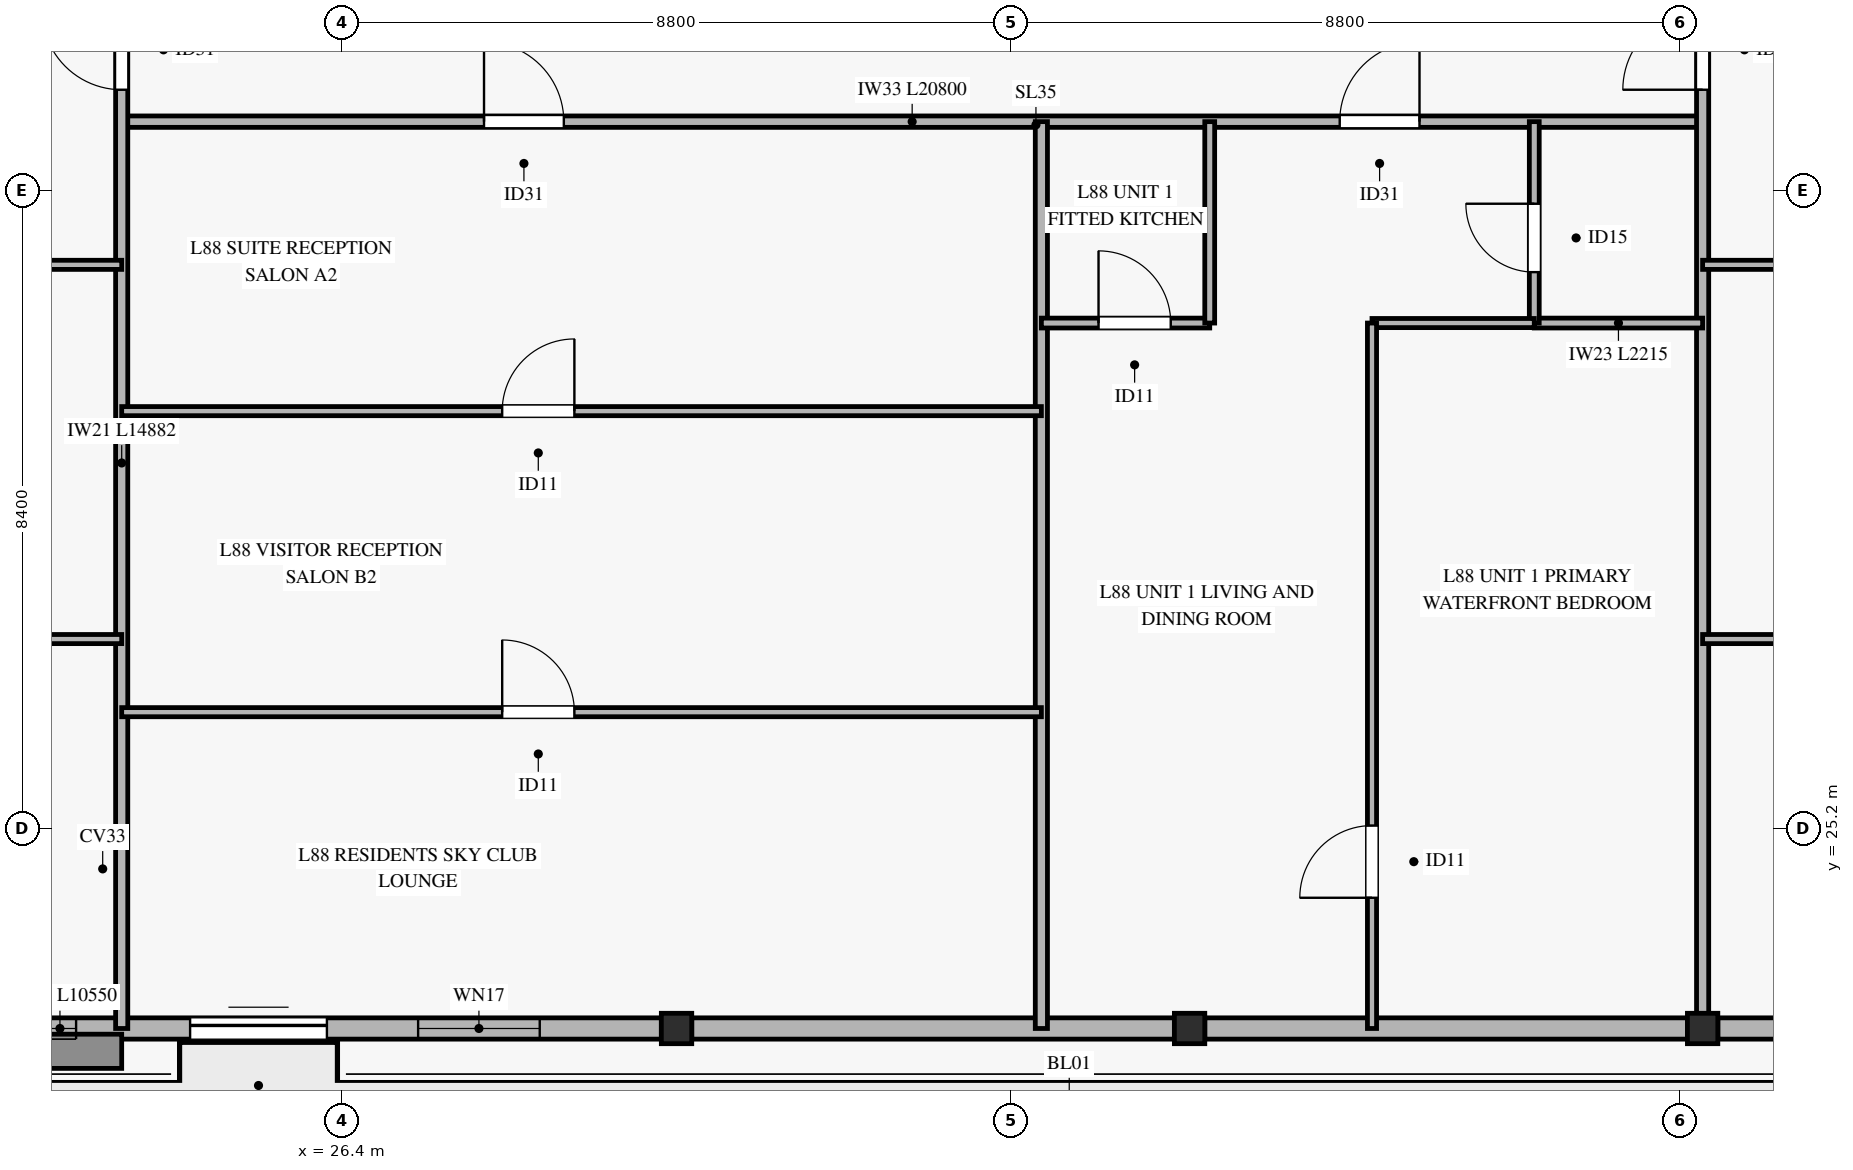
"""IFC4 building model, lengths in metres.
Left out: names, types, materials, properties, quantities, classifications, styles, units other than length and angle.
Written with IfcOpenShell. Run it as: python <this file> out.ifc"""

import sys

from ifc_helpers import new_model, si_unit, direction, frame, frame_2d, origin, origin_2d, place, context, subcontext, project, spatial, rectangle, hollow_rectangle, extrude, source, transform, mapped, element, fill, save


model = new_model("IFC4")
c1 = context("Model", 3, precision=1e-05, world=origin(), true_north=direction((0.0, 1.0)))
c2 = subcontext(c1, "Body", "Model", "MODEL_VIEW")
j1 = project(units=[si_unit("LENGTHUNIT", "METRE"), si_unit("PLANEANGLEUNIT", "RADIAN")], contexts=[c1])
p1 = place(None, origin())
s1 = spatial("IfcSite", under=j1, at=p1, CompositionType="ELEMENT")
p2 = place(p1, origin())
s2 = spatial("IfcBuilding", under=s1, at=p2, CompositionType="ELEMENT")
p3 = place(p2, frame((0.0, 0.0, 339.1)))
s3 = spatial("IfcBuildingStorey", under=s2, at=p3, CompositionType="ELEMENT", Elevation=339.1)
m1 = source(origin(), c2, "Body", "SweptSolid", [
    extrude(hollow_rectangle(XDim=0.4, YDim=0.4, WallThickness=0.02, at=origin_2d()), origin(), (0.0, 0.0, 1.0), 3.185),
])
for number, where, z_axis, x_axis in (
    (1, (30.8, 22.568, 0.0), (0.0, 0.0, 1.0), (1.0, 0.0, 0.0)),
    (2, (37.55, 22.568, 0.0), (0.0, 0.0, 1.0), (1.0, 0.0, 0.0)),
    (3, (44.3, 22.568, 0.0), (0.0, 0.0, 1.0), (1.0, 0.0, 0.0)),
):
    element("IfcColumn", number, at=place(p3, frame(where, z_axis=z_axis, x_axis=x_axis)), inside=s3, PredefinedType="COLUMN", context=c2, shape_type="MappedRepresentation", body=[
        mapped(m1, transform((0.0, 0.0, 0.0), x_axis=(1.0, 0.0, 0.0), y_axis=(0.0, 1.0, 0.0), z_axis=(0.0, 0.0, 1.0), scale=1.0)),
    ])
p4 = place(p3, frame((20.05, 22.568, 0.0), z_axis=(0.0, 0.0, 1.0), x_axis=(1.0, 0.0, 0.0)))
e4 = element("IfcWall", 4, at=p4, inside=s3, PredefinedType="SOLIDWALL", context=c2, shape_type="SweptSolid", body=[
    extrude(rectangle(XDim=10.55, YDim=0.28, at=frame_2d((5.275, 0.0))), origin(), (0.0, 0.0, 1.0), 2.815),
])
p5 = place(p4, frame((4.35, 0.0, 0.0)))
e5 = element("IfcOpeningElement", 5, at=p5, cuts=e4, PredefinedType="OPENING", context=c2, shape_type="SweptSolid", body=[
    extrude(rectangle(XDim=1.8, YDim=2.25, at=frame_2d((0.9, 1.125))), frame((0.0, 0.15, 0.0), z_axis=(0.0, -1.0, 0.0), x_axis=(1.0, 0.0, 0.0)), (0.0, 0.0, 1.0), 0.3),
])
p6 = place(p4, frame((0.65, 0.0, 0.45)))
e6 = element("IfcOpeningElement", 6, at=p6, cuts=e4, PredefinedType="OPENING", context=c2, shape_type="SweptSolid", body=[
    extrude(rectangle(XDim=2.2, YDim=2.1, at=frame_2d((1.1, 1.05))), frame((0.0, 0.15, 0.0), z_axis=(0.0, -1.0, 0.0), x_axis=(1.0, 0.0, 0.0)), (0.0, 0.0, 1.0), 0.3),
])
p7 = place(p4, frame((7.35, 0.0, 0.45)))
e7 = element("IfcOpeningElement", 7, at=p7, cuts=e4, PredefinedType="OPENING", context=c2, shape_type="SweptSolid", body=[
    extrude(rectangle(XDim=1.6, YDim=2.0, at=frame_2d((0.8, 1.0))), frame((0.0, 0.15, 0.0), z_axis=(0.0, -1.0, 0.0), x_axis=(1.0, 0.0, 0.0)), (0.0, 0.0, 1.0), 0.3),
])
for number, where, z_axis, x_axis in (
    (8, (31.0, 22.568, 0.0), (0.0, 0.0, 1.0), (1.0, 0.0, 0.0)),
    (9, (37.75, 22.568, 0.0), (0.0, 0.0, 1.0), (1.0, 0.0, 0.0)),
):
    element("IfcWall", number, at=place(p3, frame(where, z_axis=z_axis, x_axis=x_axis)), inside=s3, PredefinedType="SOLIDWALL", context=c2, shape_type="SweptSolid", body=[
        extrude(rectangle(XDim=6.35, YDim=0.28, at=frame_2d((3.175, 0.0))), origin(), (0.0, 0.0, 1.0), 2.815),
    ])
p8 = place(p3, frame((44.5, 22.568, 0.0), z_axis=(0.0, 0.0, 1.0), x_axis=(1.0, 0.0, 0.0)))
e10 = element("IfcWall", 10, at=p8, inside=s3, PredefinedType="SOLIDWALL", context=c2, shape_type="SweptSolid", body=[
    extrude(rectangle(XDim=5.85, YDim=0.28, at=frame_2d((2.925, 0.0))), origin(), (0.0, 0.0, 1.0), 2.815),
])
p9 = place(p8, frame((2.0, 0.0, 0.0)))
e11 = element("IfcOpeningElement", 11, at=p9, cuts=e10, PredefinedType="OPENING", context=c2, shape_type="SweptSolid", body=[
    extrude(rectangle(XDim=1.8, YDim=2.25, at=frame_2d((0.9, 1.125))), frame((0.0, 0.15, 0.0), z_axis=(0.0, -1.0, 0.0), x_axis=(1.0, 0.0, 0.0)), (0.0, 0.0, 1.0), 0.3),
])
p10 = place(p3, frame((23.5, 34.5, 0.0), z_axis=(0.0, 0.0, 1.0), x_axis=(1.0, 0.0, 0.0)))
e12 = element("IfcWall", 12, at=p10, inside=s3, PredefinedType="PARTITIONING", context=c2, shape_type="SweptSolid", body=[
    extrude(rectangle(XDim=20.8, YDim=0.15, at=frame_2d((10.4, 0.0))), origin(), (0.0, 0.0, 1.0), 2.47),
])
p11 = place(p10, frame((4.767, 0.0, 0.0)))
e13 = element("IfcOpeningElement", 13, at=p11, cuts=e12, PredefinedType="OPENING", context=c2, shape_type="SweptSolid", body=[
    extrude(rectangle(XDim=1.05, YDim=2.15, at=frame_2d((0.525, 1.075))), frame((0.0, 0.085, 0.0), z_axis=(0.0, -1.0, 0.0), x_axis=(1.0, 0.0, 0.0)), (0.0, 0.0, 1.0), 0.17),
])
p12 = place(p10, frame((16.025, 0.0, 0.0)))
e14 = element("IfcOpeningElement", 14, at=p12, cuts=e12, PredefinedType="OPENING", context=c2, shape_type="SweptSolid", body=[
    extrude(rectangle(XDim=1.05, YDim=2.15, at=frame_2d((0.525, 1.075))), frame((0.0, 0.085, 0.0), z_axis=(0.0, -1.0, 0.0), x_axis=(1.0, 0.0, 0.0)), (0.0, 0.0, 1.0), 0.17),
])
p13 = place(p3, frame((23.5, 22.568, 0.0), z_axis=(0.0, 0.0, 1.0), x_axis=(0.0, 1.0, 0.0)))
e15 = element("IfcWall", 15, at=p13, inside=s3, PredefinedType="PARTITIONING", context=c2, shape_type="SweptSolid", body=[
    extrude(rectangle(XDim=14.882, YDim=0.16, at=frame_2d((7.441, 0.0))), origin(), (0.0, 0.0, 1.0), 2.77),
])
p14 = place(p13, frame((12.352, 0.0, 0.0)))
e16 = element("IfcOpeningElement", 16, at=p14, cuts=e15, PredefinedType="OPENING", context=c2, shape_type="SweptSolid", body=[
    extrude(rectangle(XDim=1.05, YDim=2.15, at=frame_2d((0.525, 1.075))), frame((0.0, 0.09, 0.0), z_axis=(0.0, -1.0, 0.0), x_axis=(1.0, 0.0, 0.0)), (0.0, 0.0, 1.0), 0.18),
])
p15 = place(p3, frame((35.6, 22.568, 0.0), z_axis=(0.0, 0.0, 1.0), x_axis=(0.0, 1.0, 0.0)))
e17 = element("IfcWall", 17, at=p15, inside=s3, PredefinedType="PARTITIONING", context=c2, shape_type="SweptSolid", body=[
    extrude(rectangle(XDim=11.932, YDim=0.16, at=frame_2d((5.966, 0.0))), origin(), (0.0, 0.0, 1.0), 2.77),
])
p16 = place(p3, frame((44.3, 22.568, 0.0), z_axis=(0.0, 0.0, 1.0), x_axis=(0.0, 1.0, 0.0)))
e18 = element("IfcWall", 18, at=p16, inside=s3, PredefinedType="PARTITIONING", context=c2, shape_type="SweptSolid", body=[
    extrude(rectangle(XDim=14.882, YDim=0.16, at=frame_2d((7.441, 0.0))), origin(), (0.0, 0.0, 1.0), 2.47),
])
p17 = place(p16, frame((12.352, 0.0, 0.0)))
e19 = element("IfcOpeningElement", 19, at=p17, cuts=e18, PredefinedType="OPENING", context=c2, shape_type="SweptSolid", body=[
    extrude(rectangle(XDim=1.05, YDim=2.15, at=frame_2d((0.525, 1.075))), frame((0.0, 0.09, 0.0), z_axis=(0.0, -1.0, 0.0), x_axis=(1.0, 0.0, 0.0)), (0.0, 0.0, 1.0), 0.18),
])
p18 = place(p3, frame((11.685, 27.692, 0.0), z_axis=(0.0, 0.0, 1.0), x_axis=(1.0, 0.0, 0.0)))
e20 = element("IfcWall", 20, at=p18, inside=s3, PredefinedType="PARTITIONING", context=c2, shape_type="SweptSolid", body=[
    extrude(rectangle(XDim=11.815, YDim=0.12, at=frame_2d((5.907, 0.0))), origin(), (0.0, 0.0, 1.0), 2.47),
])
p19 = place(p18, frame((5.012, 0.0, 0.0)))
e21 = element("IfcOpeningElement", 21, at=p19, cuts=e20, PredefinedType="OPENING", context=c2, shape_type="SweptSolid", body=[
    extrude(rectangle(XDim=0.95, YDim=2.1, at=frame_2d((0.475, 1.05))), frame((0.0, 0.07, 0.0), z_axis=(0.0, -1.0, 0.0), x_axis=(1.0, 0.0, 0.0)), (0.0, 0.0, 1.0), 0.14),
])
p20 = place(p3, frame((11.685, 32.616, 0.0), z_axis=(0.0, 0.0, 1.0), x_axis=(1.0, 0.0, 0.0)))
e22 = element("IfcWall", 22, at=p20, inside=s3, PredefinedType="PARTITIONING", context=c2, shape_type="SweptSolid", body=[
    extrude(rectangle(XDim=11.815, YDim=0.12, at=frame_2d((5.907, 0.0))), origin(), (0.0, 0.0, 1.0), 2.47),
])
p21 = place(p20, frame((5.012, 0.0, 0.0)))
e23 = element("IfcOpeningElement", 23, at=p21, cuts=e22, PredefinedType="OPENING", context=c2, shape_type="SweptSolid", body=[
    extrude(rectangle(XDim=0.95, YDim=2.1, at=frame_2d((0.475, 1.05))), frame((0.0, 0.07, 0.0), z_axis=(0.0, -1.0, 0.0), x_axis=(1.0, 0.0, 0.0)), (0.0, 0.0, 1.0), 0.14),
])
p22 = place(p3, frame((23.5, 26.73, 0.0), z_axis=(0.0, 0.0, 1.0), x_axis=(1.0, 0.0, 0.0)))
e24 = element("IfcWall", 24, at=p22, inside=s3, PredefinedType="PARTITIONING", context=c2, shape_type="SweptSolid", body=[
    extrude(rectangle(XDim=12.1, YDim=0.12, at=frame_2d((6.05, 0.0))), origin(), (0.0, 0.0, 1.0), 2.47),
])
p23 = place(p22, frame((5.006, 0.0, 0.0)))
e25 = element("IfcOpeningElement", 25, at=p23, cuts=e24, PredefinedType="OPENING", context=c2, shape_type="SweptSolid", body=[
    extrude(rectangle(XDim=0.95, YDim=2.1, at=frame_2d((0.475, 1.05))), frame((0.0, 0.07, 0.0), z_axis=(0.0, -1.0, 0.0), x_axis=(1.0, 0.0, 0.0)), (0.0, 0.0, 1.0), 0.14),
])
p24 = place(p3, frame((23.5, 30.691, 0.0), z_axis=(0.0, 0.0, 1.0), x_axis=(1.0, 0.0, 0.0)))
e26 = element("IfcWall", 26, at=p24, inside=s3, PredefinedType="PARTITIONING", context=c2, shape_type="SweptSolid", body=[
    extrude(rectangle(XDim=12.1, YDim=0.12, at=frame_2d((6.05, 0.0))), origin(), (0.0, 0.0, 1.0), 2.47),
])
p25 = place(p24, frame((5.006, 0.0, 0.0)))
e27 = element("IfcOpeningElement", 27, at=p25, cuts=e26, PredefinedType="OPENING", context=c2, shape_type="SweptSolid", body=[
    extrude(rectangle(XDim=0.95, YDim=2.1, at=frame_2d((0.475, 1.05))), frame((0.0, 0.07, 0.0), z_axis=(0.0, -1.0, 0.0), x_axis=(1.0, 0.0, 0.0)), (0.0, 0.0, 1.0), 0.14),
])
p26 = place(p3, frame((35.6, 31.85, 0.0), z_axis=(0.0, 0.0, 1.0), x_axis=(1.0, 0.0, 0.0)))
e28 = element("IfcWall", 28, at=p26, inside=s3, PredefinedType="PARTITIONING", context=c2, shape_type="SweptSolid", body=[
    extrude(rectangle(XDim=2.215, YDim=0.13, at=frame_2d((1.107, 0.0))), origin(), (0.0, 0.0, 1.0), 2.47),
])
p27 = place(p26, frame((0.752, 0.0, 0.0)))
e29 = element("IfcOpeningElement", 29, at=p27, cuts=e28, PredefinedType="OPENING", context=c2, shape_type="SweptSolid", body=[
    extrude(rectangle(XDim=0.95, YDim=2.1, at=frame_2d((0.475, 1.05))), frame((0.0, 0.075, 0.0), z_axis=(0.0, -1.0, 0.0), x_axis=(1.0, 0.0, 0.0)), (0.0, 0.0, 1.0), 0.15),
])
p28 = place(p3, frame((37.815, 31.85, 0.0), z_axis=(0.0, 0.0, 1.0), x_axis=(0.0, 1.0, 0.0)))
e30 = element("IfcWall", 30, at=p28, inside=s3, PredefinedType="PARTITIONING", context=c2, shape_type="SweptSolid", body=[
    extrude(rectangle(XDim=2.65, YDim=0.13, at=frame_2d((1.325, 0.0))), origin(), (0.0, 0.0, 1.0), 2.77),
])
p29 = place(p3, frame((42.085, 31.85, 0.0), z_axis=(0.0, 0.0, 1.0), x_axis=(1.0, 0.0, 0.0)))
e31 = element("IfcWall", 31, at=p29, inside=s3, PredefinedType="PARTITIONING", context=c2, shape_type="SweptSolid", body=[
    extrude(rectangle(XDim=2.215, YDim=0.13, at=frame_2d((1.107, 0.0))), origin(), (0.0, 0.0, 1.0), 2.47),
])
p30 = place(p3, frame((42.085, 31.85, 0.0), z_axis=(0.0, 0.0, 1.0), x_axis=(0.0, 1.0, 0.0)))
e32 = element("IfcWall", 32, at=p30, inside=s3, PredefinedType="PARTITIONING", context=c2, shape_type="SweptSolid", body=[
    extrude(rectangle(XDim=2.65, YDim=0.13, at=frame_2d((1.325, 0.0))), origin(), (0.0, 0.0, 1.0), 2.77),
])
p31 = place(p30, frame((0.67, 0.0, 0.0)))
e33 = element("IfcOpeningElement", 33, at=p31, cuts=e32, PredefinedType="OPENING", context=c2, shape_type="SweptSolid", body=[
    extrude(rectangle(XDim=0.9, YDim=2.1, at=frame_2d((0.45, 1.05))), frame((0.0, 0.075, 0.0), z_axis=(0.0, -1.0, 0.0), x_axis=(1.0, 0.0, 0.0)), (0.0, 0.0, 1.0), 0.15),
])
p32 = place(p3, frame((39.95, 31.85, 0.0), z_axis=(0.0, 0.0, 1.0), x_axis=(1.0, 0.0, 0.0)))
e34 = element("IfcWall", 34, at=p32, inside=s3, PredefinedType="PARTITIONING", context=c2, shape_type="SweptSolid", body=[
    extrude(rectangle(XDim=2.135, YDim=0.12, at=frame_2d((1.067, 0.0))), origin(), (0.0, 0.0, 1.0), 3.185),
])
p33 = place(p3, frame((39.95, 22.568, 0.0), z_axis=(0.0, 0.0, 1.0), x_axis=(0.0, 1.0, 0.0)))
e35 = element("IfcWall", 35, at=p33, inside=s3, PredefinedType="PARTITIONING", context=c2, shape_type="SweptSolid", body=[
    extrude(rectangle(XDim=9.282, YDim=0.12, at=frame_2d((4.641, 0.0))), origin(), (0.0, 0.0, 1.0), 2.77),
])
p34 = place(p33, frame((1.72, 0.0, 0.0)))
e36 = element("IfcOpeningElement", 36, at=p34, cuts=e35, PredefinedType="OPENING", context=c2, shape_type="SweptSolid", body=[
    extrude(rectangle(XDim=0.95, YDim=2.1, at=frame_2d((0.475, 1.05))), frame((0.0, 0.07, 0.0), z_axis=(0.0, -1.0, 0.0), x_axis=(1.0, 0.0, 0.0)), (0.0, 0.0, 1.0), 0.14),
])
p35 = place(p3, frame((44.3, 27.692, 0.0), z_axis=(0.0, 0.0, 1.0), x_axis=(1.0, 0.0, 0.0)))
e37 = element("IfcWall", 37, at=p35, inside=s3, PredefinedType="PARTITIONING", context=c2, shape_type="SweptSolid", body=[
    extrude(rectangle(XDim=14.415, YDim=0.12, at=frame_2d((7.208, 0.0))), origin(), (0.0, 0.0, 1.0), 2.47),
])
p36 = place(p35, frame((5.852, 0.0, 0.0)))
e38 = element("IfcOpeningElement", 38, at=p36, cuts=e37, PredefinedType="OPENING", context=c2, shape_type="SweptSolid", body=[
    extrude(rectangle(XDim=0.95, YDim=2.1, at=frame_2d((0.475, 1.05))), frame((0.0, 0.07, 0.0), z_axis=(0.0, -1.0, 0.0), x_axis=(1.0, 0.0, 0.0)), (0.0, 0.0, 1.0), 0.14),
])
p37 = place(p3, frame((44.3, 32.616, 0.0), z_axis=(0.0, 0.0, 1.0), x_axis=(1.0, 0.0, 0.0)))
e39 = element("IfcWall", 39, at=p37, inside=s3, PredefinedType="PARTITIONING", context=c2, shape_type="SweptSolid", body=[
    extrude(rectangle(XDim=14.415, YDim=0.12, at=frame_2d((7.208, 0.0))), origin(), (0.0, 0.0, 1.0), 2.47),
])
p38 = place(p37, frame((5.852, 0.0, 0.0)))
e40 = element("IfcOpeningElement", 40, at=p38, cuts=e39, PredefinedType="OPENING", context=c2, shape_type="SweptSolid", body=[
    extrude(rectangle(XDim=0.95, YDim=2.1, at=frame_2d((0.475, 1.05))), frame((0.0, 0.07, 0.0), z_axis=(0.0, -1.0, 0.0), x_axis=(1.0, 0.0, 0.0)), (0.0, 0.0, 1.0), 0.14),
])
m2 = source(origin(), c2, "Body", "SweptSolid", [
    extrude(rectangle(XDim=1.8, YDim=2.25, at=frame_2d((0.9, 1.125))), frame((0.0, 0.025, 0.0), z_axis=(0.0, -1.0, 0.0), x_axis=(1.0, 0.0, 0.0)), (0.0, 0.0, 1.0), 0.05),
])
p39 = place(p5, origin())
e41 = element("IfcDoor", 41, at=p39, inside=s3, OperationType="SLIDING_TO_LEFT", PredefinedType="DOOR", context=c2, shape_type="MappedRepresentation", body=[
    mapped(m2, transform((0.0, 0.0, 0.0), x_axis=(1.0, 0.0, 0.0), y_axis=(0.0, 1.0, 0.0), z_axis=(0.0, 0.0, 1.0), scale=1.0)),
])
fill(e5, e41)
m3 = source(origin(), c2, "Body", "SweptSolid", [
    extrude(rectangle(XDim=2.2, YDim=2.1, at=frame_2d((1.1, 1.05))), frame((0.0, 0.03, 0.0), z_axis=(0.0, -1.0, 0.0), x_axis=(1.0, 0.0, 0.0)), (0.0, 0.0, 1.0), 0.06),
])
p40 = place(p6, origin())
e42 = element("IfcWindow", 42, at=p40, inside=s3, PartitioningType="SINGLE_PANEL", PredefinedType="WINDOW", context=c2, shape_type="MappedRepresentation", body=[
    mapped(m3, transform((0.0, 0.0, 0.0), x_axis=(1.0, 0.0, 0.0), y_axis=(0.0, 1.0, 0.0), z_axis=(0.0, 0.0, 1.0), scale=1.0)),
])
fill(e6, e42)
m4 = source(origin(), c2, "Body", "SweptSolid", [
    extrude(rectangle(XDim=1.6, YDim=2.0, at=frame_2d((0.8, 1.0))), frame((0.0, 0.03, 0.0), z_axis=(0.0, -1.0, 0.0), x_axis=(1.0, 0.0, 0.0)), (0.0, 0.0, 1.0), 0.06),
])
p41 = place(p7, origin())
e43 = element("IfcWindow", 43, at=p41, inside=s3, PartitioningType="SINGLE_PANEL", PredefinedType="WINDOW", context=c2, shape_type="MappedRepresentation", body=[
    mapped(m4, transform((0.0, 0.0, 0.0), x_axis=(1.0, 0.0, 0.0), y_axis=(0.0, 1.0, 0.0), z_axis=(0.0, 0.0, 1.0), scale=1.0)),
])
fill(e7, e43)
m5 = source(origin(), c2, "Body", "SweptSolid", [
    extrude(rectangle(XDim=1.05, YDim=2.15, at=frame_2d((0.525, 1.075))), frame((0.0, 0.025, 0.0), z_axis=(0.0, -1.0, 0.0), x_axis=(1.0, 0.0, 0.0)), (0.0, 0.0, 1.0), 0.05),
])
p42 = place(p14, origin())
e44 = element("IfcDoor", 44, at=p42, inside=s3, OperationType="SINGLE_SWING_RIGHT", PredefinedType="DOOR", context=c2, shape_type="MappedRepresentation", body=[
    mapped(m5, transform((0.0, 0.0, 0.0), x_axis=(1.0, 0.0, 0.0), y_axis=(0.0, 1.0, 0.0), z_axis=(0.0, 0.0, 1.0), scale=1.0)),
])
fill(e16, e44)
p43 = place(p11, origin())
e45 = element("IfcDoor", 45, at=p43, inside=s3, OperationType="SINGLE_SWING_LEFT", PredefinedType="DOOR", context=c2, shape_type="MappedRepresentation", body=[
    mapped(m5, transform((0.0, 0.0, 0.0), x_axis=(1.0, 0.0, 0.0), y_axis=(0.0, 1.0, 0.0), z_axis=(0.0, 0.0, 1.0), scale=1.0)),
])
fill(e13, e45)
m6 = source(origin(), c2, "Body", "SweptSolid", [
    extrude(rectangle(XDim=0.95, YDim=2.1, at=frame_2d((0.475, 1.05))), frame((0.0, 0.025, 0.0), z_axis=(0.0, -1.0, 0.0), x_axis=(1.0, 0.0, 0.0)), (0.0, 0.0, 1.0), 0.05),
])
p44 = place(p25, origin())
e46 = element("IfcDoor", 46, at=p44, inside=s3, OperationType="SINGLE_SWING_RIGHT", PredefinedType="DOOR", context=c2, shape_type="MappedRepresentation", body=[
    mapped(m6, transform((0.0, 0.0, 0.0), x_axis=(1.0, 0.0, 0.0), y_axis=(0.0, 1.0, 0.0), z_axis=(0.0, 0.0, 1.0), scale=1.0)),
])
fill(e27, e46)
p45 = place(p23, origin())
e47 = element("IfcDoor", 47, at=p45, inside=s3, OperationType="SINGLE_SWING_LEFT", PredefinedType="DOOR", context=c2, shape_type="MappedRepresentation", body=[
    mapped(m6, transform((0.0, 0.0, 0.0), x_axis=(1.0, 0.0, 0.0), y_axis=(0.0, 1.0, 0.0), z_axis=(0.0, 0.0, 1.0), scale=1.0)),
])
fill(e25, e47)
p46 = place(p12, origin())
e48 = element("IfcDoor", 48, at=p46, inside=s3, OperationType="SINGLE_SWING_RIGHT", PredefinedType="DOOR", context=c2, shape_type="MappedRepresentation", body=[
    mapped(m5, transform((0.0, 0.0, 0.0), x_axis=(1.0, 0.0, 0.0), y_axis=(0.0, 1.0, 0.0), z_axis=(0.0, 0.0, 1.0), scale=1.0)),
])
fill(e14, e48)
p47 = place(p27, origin())
e49 = element("IfcDoor", 49, at=p47, inside=s3, OperationType="SINGLE_SWING_LEFT", PredefinedType="DOOR", context=c2, shape_type="MappedRepresentation", body=[
    mapped(m6, transform((0.0, 0.0, 0.0), x_axis=(1.0, 0.0, 0.0), y_axis=(0.0, 1.0, 0.0), z_axis=(0.0, 0.0, 1.0), scale=1.0)),
])
fill(e29, e49)
m7 = source(origin(), c2, "Body", "SweptSolid", [
    extrude(rectangle(XDim=0.9, YDim=2.1, at=frame_2d((0.45, 1.05))), frame((0.0, 0.025, 0.0), z_axis=(0.0, -1.0, 0.0), x_axis=(1.0, 0.0, 0.0)), (0.0, 0.0, 1.0), 0.05),
])
p48 = place(p31, origin())
e50 = element("IfcDoor", 50, at=p48, inside=s3, OperationType="SINGLE_SWING_RIGHT", PredefinedType="DOOR", context=c2, shape_type="MappedRepresentation", body=[
    mapped(m7, transform((0.0, 0.0, 0.0), x_axis=(1.0, 0.0, 0.0), y_axis=(0.0, 1.0, 0.0), z_axis=(0.0, 0.0, 1.0), scale=1.0)),
])
fill(e33, e50)
p49 = place(p34, origin())
e51 = element("IfcDoor", 51, at=p49, inside=s3, OperationType="SINGLE_SWING_LEFT", PredefinedType="DOOR", context=c2, shape_type="MappedRepresentation", body=[
    mapped(m6, transform((0.0, 0.0, 0.0), x_axis=(1.0, 0.0, 0.0), y_axis=(0.0, 1.0, 0.0), z_axis=(0.0, 0.0, 1.0), scale=1.0)),
])
fill(e36, e51)
p50 = place(p17, origin())
e52 = element("IfcDoor", 52, at=p50, inside=s3, OperationType="SINGLE_SWING_LEFT", PredefinedType="DOOR", context=c2, shape_type="MappedRepresentation", body=[
    mapped(m5, transform((0.0, 0.0, 0.0), x_axis=(1.0, 0.0, 0.0), y_axis=(0.0, 1.0, 0.0), z_axis=(0.0, 0.0, 1.0), scale=1.0)),
])
fill(e19, e52)
save(model, sys.argv[1])
